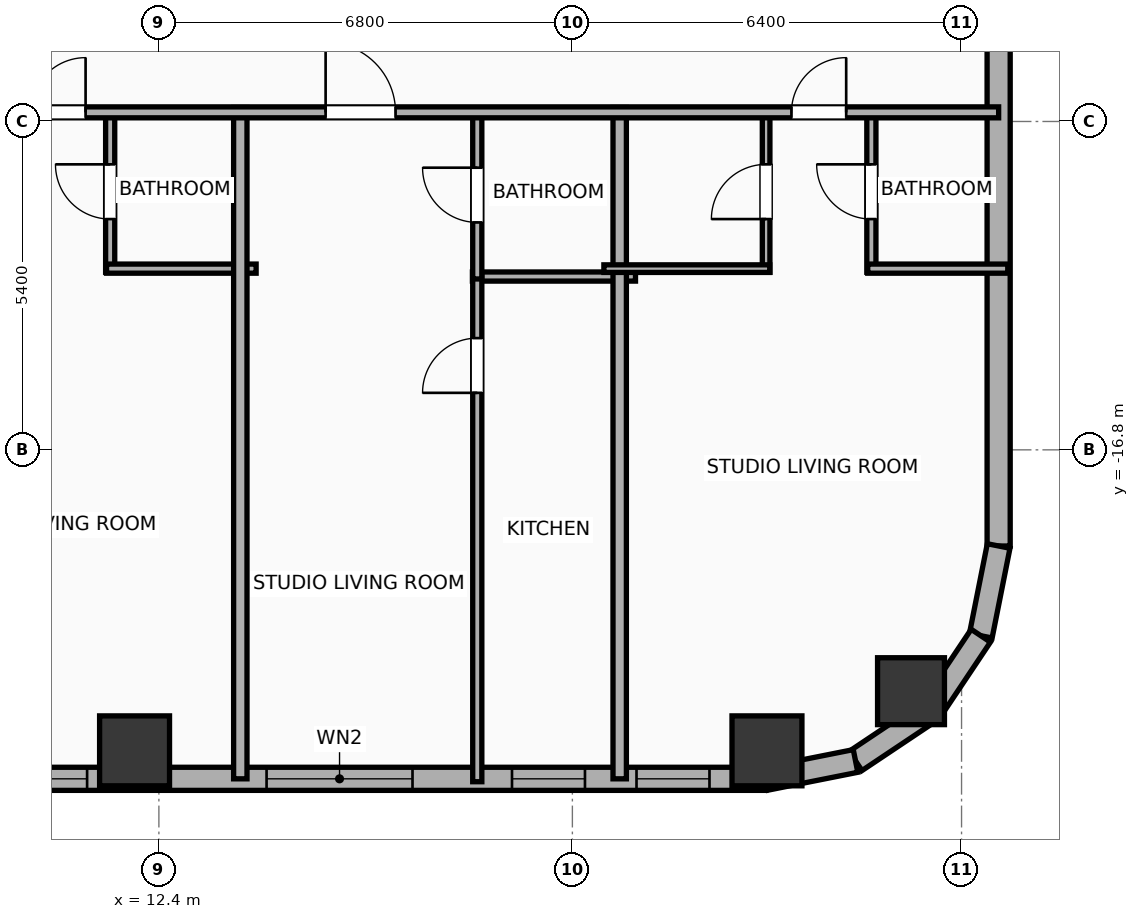
"""IFC4 building model, lengths in metres.
Left out: names, types, materials, properties, quantities, classifications, styles, units other than length and angle.
Written with IfcOpenShell. Run it as: python <this file> out.ifc"""

import sys

from ifc_helpers import new_model, si_unit, direction, frame, frame_2d, origin, origin_2d, place, context, subcontext, project, spatial, rectangle, hollow_rectangle, hollow_circle, extrude, element, fill, save


model = new_model("IFC4")
c1 = context("Model", 3, precision=1e-05, world=origin(), true_north=direction((0.0, 1.0)))
c2 = subcontext(c1, "Body", "Model", "MODEL_VIEW")
j1 = project(units=[si_unit("LENGTHUNIT", "METRE"), si_unit("PLANEANGLEUNIT", "RADIAN")], contexts=[c1])
p1 = place(None, origin())
s1 = spatial("IfcSite", under=j1, at=p1, CompositionType="ELEMENT")
p2 = place(p1, origin())
s2 = spatial("IfcBuilding", under=s1, at=p2, CompositionType="ELEMENT")
p3 = place(p2, frame((0.0, 0.0, 76.7)))
s3 = spatial("IfcBuildingStorey", under=s2, at=p3, CompositionType="ELEMENT", Elevation=76.7)
for number, where, z_axis, x_axis in (
    (1, (12.0, -21.75, 0.0), (0.0, 0.0, 1.0), (1.0, 0.0, 0.0)),
    (2, (22.4, -21.75, 0.0), (0.0, 0.0, 1.0), (1.0, 0.0, 0.0)),
):
    element("IfcColumn", number, at=place(p3, frame(where, z_axis=z_axis, x_axis=x_axis)), inside=s3, PredefinedType="COLUMN", context=c2, shape_type="SweptSolid", body=[
        extrude(hollow_rectangle(XDim=1.15, YDim=1.15, WallThickness=0.04, at=origin_2d()), origin(), (0.0, 0.0, 1.0), 3.9),
    ])
p4 = place(p3, frame((24.769, -20.769, 0.0), z_axis=(0.0, 0.0, 1.0), x_axis=(1.0, 0.0, 0.0)))
e3 = element("IfcColumn", 3, at=p4, inside=s3, PredefinedType="COLUMN", context=c2, shape_type="SweptSolid", body=[
    extrude(hollow_circle(Radius=0.55, WallThickness=0.036, at=origin_2d()), origin(), (0.0, 0.0, 1.0), 3.9),
])
p5 = place(p3, frame((22.381, -22.21, 0.0), z_axis=(0.0, 0.0, 1.0), x_axis=(-1.0, 0.0, 0.0)))
e4 = element("IfcWall", 4, at=p5, inside=s3, PredefinedType="ELEMENTEDWALL", context=c2, shape_type="SweptSolid", body=[
    extrude(rectangle(XDim=51.963, YDim=0.38, at=frame_2d((25.981, 0.0))), origin(), (0.0, 0.0, 1.0), 3.6),
])
p6 = place(p5, frame((5.81, 0.0, 0.75)))
e5 = element("IfcOpeningElement", 5, at=p6, cuts=e4, PredefinedType="OPENING", context=c2, shape_type="SweptSolid", body=[
    extrude(rectangle(XDim=2.4, YDim=2.1, at=frame_2d((1.2, 1.05))), frame((0.0, 0.2, 0.0), z_axis=(0.0, -1.0, 0.0), x_axis=(1.0, 0.0, 0.0)), (0.0, 0.0, 1.0), 0.4),
])
p7 = place(p5, frame((49.106, 0.0, 0.75)))
e6 = element("IfcOpeningElement", 6, at=p7, cuts=e4, PredefinedType="OPENING", context=c2, shape_type="SweptSolid", body=[
    extrude(rectangle(XDim=1.2, YDim=2.05, at=frame_2d((0.6, 1.025))), frame((0.0, 0.2, 0.0), z_axis=(0.0, -1.0, 0.0), x_axis=(1.0, 0.0, 0.0)), (0.0, 0.0, 1.0), 0.4),
])
p8 = place(p5, frame((45.716, 0.0, 0.75)))
e7 = element("IfcOpeningElement", 7, at=p8, cuts=e4, PredefinedType="OPENING", context=c2, shape_type="SweptSolid", body=[
    extrude(rectangle(XDim=1.2, YDim=2.05, at=frame_2d((0.6, 1.025))), frame((0.0, 0.2, 0.0), z_axis=(0.0, -1.0, 0.0), x_axis=(1.0, 0.0, 0.0)), (0.0, 0.0, 1.0), 0.4),
])
p9 = place(p5, frame((42.346, 0.0, 0.75)))
e8 = element("IfcOpeningElement", 8, at=p9, cuts=e4, PredefinedType="OPENING", context=c2, shape_type="SweptSolid", body=[
    extrude(rectangle(XDim=1.2, YDim=2.05, at=frame_2d((0.6, 1.025))), frame((0.0, 0.2, 0.0), z_axis=(0.0, -1.0, 0.0), x_axis=(1.0, 0.0, 0.0)), (0.0, 0.0, 1.0), 0.4),
])
p10 = place(p5, frame((35.811, 0.0, 0.75)))
e9 = element("IfcOpeningElement", 9, at=p10, cuts=e4, PredefinedType="OPENING", context=c2, shape_type="SweptSolid", body=[
    extrude(rectangle(XDim=1.2, YDim=2.05, at=frame_2d((0.6, 1.025))), frame((0.0, 0.2, 0.0), z_axis=(0.0, -1.0, 0.0), x_axis=(1.0, 0.0, 0.0)), (0.0, 0.0, 1.0), 0.4),
])
p11 = place(p5, frame((39.061, 0.0, 0.75)))
e10 = element("IfcOpeningElement", 10, at=p11, cuts=e4, PredefinedType="OPENING", context=c2, shape_type="SweptSolid", body=[
    extrude(rectangle(XDim=1.2, YDim=2.05, at=frame_2d((0.6, 1.025))), frame((0.0, 0.2, 0.0), z_axis=(0.0, -1.0, 0.0), x_axis=(1.0, 0.0, 0.0)), (0.0, 0.0, 1.0), 0.4),
])
p12 = place(p5, frame((29.211, 0.0, 0.75)))
e11 = element("IfcOpeningElement", 11, at=p12, cuts=e4, PredefinedType="OPENING", context=c2, shape_type="SweptSolid", body=[
    extrude(rectangle(XDim=1.2, YDim=2.05, at=frame_2d((0.6, 1.025))), frame((0.0, 0.2, 0.0), z_axis=(0.0, -1.0, 0.0), x_axis=(1.0, 0.0, 0.0)), (0.0, 0.0, 1.0), 0.4),
])
p13 = place(p5, frame((22.757, 0.0, 0.75)))
e12 = element("IfcOpeningElement", 12, at=p13, cuts=e4, PredefinedType="OPENING", context=c2, shape_type="SweptSolid", body=[
    extrude(rectangle(XDim=1.2, YDim=2.05, at=frame_2d((0.6, 1.025))), frame((0.0, 0.2, 0.0), z_axis=(0.0, -1.0, 0.0), x_axis=(1.0, 0.0, 0.0)), (0.0, 0.0, 1.0), 0.4),
])
p14 = place(p5, frame((26.007, 0.0, 0.75)))
e13 = element("IfcOpeningElement", 13, at=p14, cuts=e4, PredefinedType="OPENING", context=c2, shape_type="SweptSolid", body=[
    extrude(rectangle(XDim=1.2, YDim=2.05, at=frame_2d((0.6, 1.025))), frame((0.0, 0.2, 0.0), z_axis=(0.0, -1.0, 0.0), x_axis=(1.0, 0.0, 0.0)), (0.0, 0.0, 1.0), 0.4),
])
p15 = place(p5, frame((18.697, 0.0, 0.75)))
e14 = element("IfcOpeningElement", 14, at=p15, cuts=e4, PredefinedType="OPENING", context=c2, shape_type="SweptSolid", body=[
    extrude(rectangle(XDim=1.2, YDim=2.05, at=frame_2d((0.6, 1.025))), frame((0.0, 0.2, 0.0), z_axis=(0.0, -1.0, 0.0), x_axis=(1.0, 0.0, 0.0)), (0.0, 0.0, 1.0), 0.4),
])
p16 = place(p5, frame((15.447, 0.0, 0.75)))
e15 = element("IfcOpeningElement", 15, at=p16, cuts=e4, PredefinedType="OPENING", context=c2, shape_type="SweptSolid", body=[
    extrude(rectangle(XDim=1.2, YDim=2.05, at=frame_2d((0.6, 1.025))), frame((0.0, 0.2, 0.0), z_axis=(0.0, -1.0, 0.0), x_axis=(1.0, 0.0, 0.0)), (0.0, 0.0, 1.0), 0.4),
])
p17 = place(p5, frame((11.162, 0.0, 0.75)))
e16 = element("IfcOpeningElement", 16, at=p17, cuts=e4, PredefinedType="OPENING", context=c2, shape_type="SweptSolid", body=[
    extrude(rectangle(XDim=1.2, YDim=2.05, at=frame_2d((0.6, 1.025))), frame((0.0, 0.2, 0.0), z_axis=(0.0, -1.0, 0.0), x_axis=(1.0, 0.0, 0.0)), (0.0, 0.0, 1.0), 0.4),
])
p18 = place(p5, frame((2.974, 0.0, 0.75)))
e17 = element("IfcOpeningElement", 17, at=p18, cuts=e4, PredefinedType="OPENING", context=c2, shape_type="SweptSolid", body=[
    extrude(rectangle(XDim=1.2, YDim=2.05, at=frame_2d((0.6, 1.025))), frame((0.0, 0.2, 0.0), z_axis=(0.0, -1.0, 0.0), x_axis=(1.0, 0.0, 0.0)), (0.0, 0.0, 1.0), 0.4),
])
p19 = place(p5, frame((0.927, 0.0, 0.75)))
e18 = element("IfcOpeningElement", 18, at=p19, cuts=e4, PredefinedType="OPENING", context=c2, shape_type="SweptSolid", body=[
    extrude(rectangle(XDim=1.2, YDim=2.05, at=frame_2d((0.6, 1.025))), frame((0.0, 0.2, 0.0), z_axis=(0.0, -1.0, 0.0), x_axis=(1.0, 0.0, 0.0)), (0.0, 0.0, 1.0), 0.4),
])
p20 = place(p3, frame((26.21, 18.381, 0.0), z_axis=(0.0, 0.0, 1.0), x_axis=(0.0, -1.0, 0.0)))
e19 = element("IfcWall", 19, at=p20, inside=s3, PredefinedType="ELEMENTEDWALL", context=c2, shape_type="SweptSolid", body=[
    extrude(rectangle(XDim=36.763, YDim=0.38, at=frame_2d((18.381, 0.0))), origin(), (0.0, 0.0, 1.0), 3.6),
])
p21 = place(p3, frame((26.21, -18.381, 0.0), z_axis=(0.0, 0.0, 1.0), x_axis=(-0.195086038585, -0.980786132421, 0.0)))
e20 = element("IfcWall", 20, at=p21, inside=s3, PredefinedType="ELEMENTEDWALL", context=c2, shape_type="SweptSolid", body=[
    extrude(rectangle(XDim=1.504, YDim=0.38, at=frame_2d((0.752, 0.0))), origin(), (0.0, 0.0, 1.0), 3.6),
])
for number, where, z_axis, x_axis in (
    (21, (25.917, -19.857, 0.0), (0.0, 0.0, 1.0), (-0.556, -0.831, 0.0)),
    (22, (25.091, -21.091, 0.0), (0.0, 0.0, 1.0), (-0.831, -0.556, 0.0)),
):
    element("IfcWall", number, at=place(p3, frame(where, z_axis=z_axis, x_axis=x_axis)), inside=s3, PredefinedType="ELEMENTEDWALL", context=c2, shape_type="SweptSolid", body=[
        extrude(rectangle(XDim=1.485, YDim=0.38, at=frame_2d((0.743, 0.0))), origin(), (0.0, 0.0, 1.0), 3.6),
    ])
p22 = place(p3, frame((23.857, -21.917, 0.0), z_axis=(0.0, 0.0, 1.0), x_axis=(-0.980786132421, -0.195086038585, 0.0)))
e23 = element("IfcWall", 23, at=p22, inside=s3, PredefinedType="ELEMENTEDWALL", context=c2, shape_type="SweptSolid", body=[
    extrude(rectangle(XDim=1.504, YDim=0.38, at=frame_2d((0.752, 0.0))), origin(), (0.0, 0.0, 1.0), 3.6),
])
p23 = place(p3, frame((11.599, -13.88, 0.0), z_axis=(0.0, 0.0, 1.0), x_axis=(0.0, 1.0, 0.0)))
e24 = element("IfcWall", 24, at=p23, inside=s3, PredefinedType="PLUMBINGWALL", context=c2, shape_type="SweptSolid", body=[
    extrude(rectangle(XDim=2.65, YDim=0.15, at=frame_2d((1.325, 0.0))), origin(), (0.0, 0.0, 1.0), 3.6),
])
p24 = place(p23, frame((0.875, 0.0, 0.0)))
e25 = element("IfcOpeningElement", 25, at=p24, cuts=e24, PredefinedType="OPENING", context=c2, shape_type="SweptSolid", body=[
    extrude(rectangle(XDim=0.9, YDim=2.05, at=frame_2d((0.45, 1.025))), frame((0.0, 0.085, 0.0), z_axis=(0.0, -1.0, 0.0), x_axis=(1.0, 0.0, 0.0)), (0.0, 0.0, 1.0), 0.17),
])
p25 = place(p3, frame((11.539, -13.82, 0.0), z_axis=(0.0, 0.0, 1.0), x_axis=(1.0, 0.0, 0.0)))
e26 = element("IfcWall", 26, at=p25, inside=s3, PredefinedType="PLUMBINGWALL", context=c2, shape_type="SweptSolid", body=[
    extrude(rectangle(XDim=2.46, YDim=0.15, at=frame_2d((1.23, 0.0))), origin(), (0.0, 0.0, 1.0), 3.6),
])
p26 = place(p3, frame((13.739, -22.21, 0.0), z_axis=(0.0, 0.0, 1.0), x_axis=(0.0, 1.0, 0.0)))
e27 = element("IfcWall", 27, at=p26, inside=s3, PredefinedType="PARTITIONING", context=c2, shape_type="SweptSolid", body=[
    extrude(rectangle(XDim=11.04, YDim=0.22, at=frame_2d((5.52, 0.0))), origin(), (0.0, 0.0, 1.0), 3.6),
])
p27 = place(p3, frame((17.556, -13.95, 0.0), z_axis=(0.0, 0.0, 1.0), x_axis=(1.0, 0.0, 0.0)))
e28 = element("IfcWall", 28, at=p27, inside=s3, PredefinedType="PLUMBINGWALL", context=c2, shape_type="SweptSolid", body=[
    extrude(rectangle(XDim=2.682, YDim=0.15, at=frame_2d((1.341, 0.0))), origin(), (0.0, 0.0, 1.0), 3.6),
])
p28 = place(p3, frame((17.636, -22.258, 0.0), z_axis=(0.0, 0.0, 1.0), x_axis=(0.0, 1.0, 0.0)))
e29 = element("IfcWall", 29, at=p28, inside=s3, PredefinedType="PLUMBINGWALL", context=c2, shape_type="SweptSolid", body=[
    extrude(rectangle(XDim=8.348, YDim=0.15, at=frame_2d((4.174, 0.0))), origin(), (0.0, 0.0, 1.0), 3.6),
])
p29 = place(p28, frame((6.395, 0.0, 0.0)))
e30 = element("IfcOpeningElement", 30, at=p29, cuts=e29, PredefinedType="OPENING", context=c2, shape_type="SweptSolid", body=[
    extrude(rectangle(XDim=0.9, YDim=2.05, at=frame_2d((0.45, 1.025))), frame((0.0, 0.085, 0.0), z_axis=(0.0, -1.0, 0.0), x_axis=(1.0, 0.0, 0.0)), (0.0, 0.0, 1.0), 0.17),
])
p30 = place(p3, frame((17.636, -13.99, 0.0), z_axis=(0.0, 0.0, 1.0), x_axis=(0.0, 1.0, 0.0)))
e31 = element("IfcWall", 31, at=p30, inside=s3, PredefinedType="PLUMBINGWALL", context=c2, shape_type="SweptSolid", body=[
    extrude(rectangle(XDim=2.76, YDim=0.15, at=frame_2d((1.38, 0.0))), origin(), (0.0, 0.0, 1.0), 3.6),
])
p31 = place(p30, frame((0.93, 0.0, 0.0)))
e32 = element("IfcOpeningElement", 32, at=p31, cuts=e31, PredefinedType="OPENING", context=c2, shape_type="SweptSolid", body=[
    extrude(rectangle(XDim=0.9, YDim=2.05, at=frame_2d((0.45, 1.025))), frame((0.0, 0.085, 0.0), z_axis=(0.0, -1.0, 0.0), x_axis=(1.0, 0.0, 0.0)), (0.0, 0.0, 1.0), 0.17),
])
p32 = place(p3, frame((19.978, -22.21, 0.0), z_axis=(0.0, 0.0, 1.0), x_axis=(0.0, 1.0, 0.0)))
e33 = element("IfcWall", 33, at=p32, inside=s3, PredefinedType="PARTITIONING", context=c2, shape_type="SweptSolid", body=[
    extrude(rectangle(XDim=11.04, YDim=0.22, at=frame_2d((5.52, 0.0))), origin(), (0.0, 0.0, 1.0), 2.89),
])
p33 = place(p3, frame((22.386, -13.88, 0.0), z_axis=(0.0, 0.0, 1.0), x_axis=(0.0, 1.0, 0.0)))
e34 = element("IfcWall", 34, at=p33, inside=s3, PredefinedType="PARTITIONING", context=c2, shape_type="SweptSolid", body=[
    extrude(rectangle(XDim=2.65, YDim=0.125, at=frame_2d((1.325, 0.0))), origin(), (0.0, 0.0, 1.0), 3.6),
])
p34 = place(p33, frame((0.875, 0.0, 0.0)))
e35 = element("IfcOpeningElement", 35, at=p34, cuts=e34, PredefinedType="OPENING", context=c2, shape_type="SweptSolid", body=[
    extrude(rectangle(XDim=0.9, YDim=2.05, at=frame_2d((0.45, 1.025))), frame((0.0, 0.073, 0.0), z_axis=(0.0, -1.0, 0.0), x_axis=(1.0, 0.0, 0.0)), (0.0, 0.0, 1.0), 0.145),
])
p35 = place(p3, frame((24.117, -13.88, 0.0), z_axis=(0.0, 0.0, 1.0), x_axis=(0.0, 1.0, 0.0)))
e36 = element("IfcWall", 36, at=p35, inside=s3, PredefinedType="PLUMBINGWALL", context=c2, shape_type="SweptSolid", body=[
    extrude(rectangle(XDim=2.65, YDim=0.15, at=frame_2d((1.325, 0.0))), origin(), (0.0, 0.0, 1.0), 3.6),
])
p36 = place(p35, frame((0.875, 0.0, 0.0)))
e37 = element("IfcOpeningElement", 37, at=p36, cuts=e36, PredefinedType="OPENING", context=c2, shape_type="SweptSolid", body=[
    extrude(rectangle(XDim=0.9, YDim=2.05, at=frame_2d((0.45, 1.025))), frame((0.0, 0.085, 0.0), z_axis=(0.0, -1.0, 0.0), x_axis=(1.0, 0.0, 0.0)), (0.0, 0.0, 1.0), 0.17),
])
p37 = place(p3, frame((19.718, -13.82, 0.0), z_axis=(0.0, 0.0, 1.0), x_axis=(1.0, 0.0, 0.0)))
e38 = element("IfcWall", 38, at=p37, inside=s3, PredefinedType="PARTITIONING", context=c2, shape_type="SweptSolid", body=[
    extrude(rectangle(XDim=2.728, YDim=0.125, at=frame_2d((1.364, 0.0))), origin(), (0.0, 0.0, 1.0), 3.6),
])
p38 = place(p3, frame((24.057, -13.82, 0.0), z_axis=(0.0, 0.0, 1.0), x_axis=(1.0, 0.0, 0.0)))
e39 = element("IfcWall", 39, at=p38, inside=s3, PredefinedType="PLUMBINGWALL", context=c2, shape_type="SweptSolid", body=[
    extrude(rectangle(XDim=2.303, YDim=0.15, at=frame_2d((1.152, 0.0))), origin(), (0.0, 0.0, 1.0), 3.6),
])
p39 = place(p3, frame((-33.41, -11.25, 0.0), z_axis=(0.0, 0.0, 1.0), x_axis=(1.0, 0.0, 0.0)))
e40 = element("IfcWall", 40, at=p39, inside=s3, PredefinedType="PARTITIONING", context=c2, shape_type="SweptSolid", body=[
    extrude(rectangle(XDim=59.62, YDim=0.18, at=frame_2d((29.81, 0.0))), origin(), (0.0, 0.0, 1.0), 3.6),
])
p40 = place(p39, frame((3.282, 0.0, 0.0)))
e41 = element("IfcOpeningElement", 41, at=p40, cuts=e40, PredefinedType="OPENING", context=c2, shape_type="SweptSolid", body=[
    extrude(rectangle(XDim=1.15, YDim=2.05, at=frame_2d((0.575, 1.025))), frame((0.0, 0.1, 0.0), z_axis=(0.0, -1.0, 0.0), x_axis=(1.0, 0.0, 0.0)), (0.0, 0.0, 1.0), 0.2),
])
p41 = place(p39, frame((10.771, 0.0, 0.0)))
e42 = element("IfcOpeningElement", 42, at=p41, cuts=e40, PredefinedType="OPENING", context=c2, shape_type="SweptSolid", body=[
    extrude(rectangle(XDim=1.15, YDim=2.05, at=frame_2d((0.575, 1.025))), frame((0.0, 0.1, 0.0), z_axis=(0.0, -1.0, 0.0), x_axis=(1.0, 0.0, 0.0)), (0.0, 0.0, 1.0), 0.2),
])
p42 = place(p39, frame((18.778, 0.0, 0.0)))
e43 = element("IfcOpeningElement", 43, at=p42, cuts=e40, PredefinedType="OPENING", context=c2, shape_type="SweptSolid", body=[
    extrude(rectangle(XDim=1.15, YDim=2.05, at=frame_2d((0.575, 1.025))), frame((0.0, 0.1, 0.0), z_axis=(0.0, -1.0, 0.0), x_axis=(1.0, 0.0, 0.0)), (0.0, 0.0, 1.0), 0.2),
])
p43 = place(p39, frame((24.34, 0.0, 0.0)))
e44 = element("IfcOpeningElement", 44, at=p43, cuts=e40, PredefinedType="OPENING", context=c2, shape_type="SweptSolid", body=[
    extrude(rectangle(XDim=0.9, YDim=2.05, at=frame_2d((0.45, 1.025))), frame((0.0, 0.1, 0.0), z_axis=(0.0, -1.0, 0.0), x_axis=(1.0, 0.0, 0.0)), (0.0, 0.0, 1.0), 0.2),
])
p44 = place(p39, frame((31.829, 0.0, 0.0)))
e45 = element("IfcOpeningElement", 45, at=p44, cuts=e40, PredefinedType="OPENING", context=c2, shape_type="SweptSolid", body=[
    extrude(rectangle(XDim=1.15, YDim=2.05, at=frame_2d((0.575, 1.025))), frame((0.0, 0.1, 0.0), z_axis=(0.0, -1.0, 0.0), x_axis=(1.0, 0.0, 0.0)), (0.0, 0.0, 1.0), 0.2),
])
p45 = place(p39, frame((35.948, 0.0, 0.0)))
e46 = element("IfcOpeningElement", 46, at=p45, cuts=e40, PredefinedType="OPENING", context=c2, shape_type="SweptSolid", body=[
    extrude(rectangle(XDim=1.15, YDim=2.05, at=frame_2d((0.575, 1.025))), frame((0.0, 0.1, 0.0), z_axis=(0.0, -1.0, 0.0), x_axis=(1.0, 0.0, 0.0)), (0.0, 0.0, 1.0), 0.2),
])
p46 = place(p39, frame((43.705, 0.0, 0.0)))
e47 = element("IfcOpeningElement", 47, at=p46, cuts=e40, PredefinedType="OPENING", context=c2, shape_type="SweptSolid", body=[
    extrude(rectangle(XDim=0.9, YDim=2.05, at=frame_2d((0.45, 1.025))), frame((0.0, 0.1, 0.0), z_axis=(0.0, -1.0, 0.0), x_axis=(1.0, 0.0, 0.0)), (0.0, 0.0, 1.0), 0.2),
])
p47 = place(p39, frame((48.552, 0.0, 0.0)))
e48 = element("IfcOpeningElement", 48, at=p47, cuts=e40, PredefinedType="OPENING", context=c2, shape_type="SweptSolid", body=[
    extrude(rectangle(XDim=1.15, YDim=2.05, at=frame_2d((0.575, 1.025))), frame((0.0, 0.1, 0.0), z_axis=(0.0, -1.0, 0.0), x_axis=(1.0, 0.0, 0.0)), (0.0, 0.0, 1.0), 0.2),
])
p48 = place(p39, frame((56.213, 0.0, 0.0)))
e49 = element("IfcOpeningElement", 49, at=p48, cuts=e40, PredefinedType="OPENING", context=c2, shape_type="SweptSolid", body=[
    extrude(rectangle(XDim=0.9, YDim=2.05, at=frame_2d((0.45, 1.025))), frame((0.0, 0.1, 0.0), z_axis=(0.0, -1.0, 0.0), x_axis=(1.0, 0.0, 0.0)), (0.0, 0.0, 1.0), 0.2),
])
p49 = place(p6, origin())
e50 = element("IfcWindow", 50, at=p49, inside=s3, PartitioningType="SINGLE_PANEL", PredefinedType="WINDOW", context=c2, shape_type="SweptSolid", body=[
    extrude(rectangle(XDim=2.4, YDim=2.1, at=frame_2d((1.2, 1.05))), frame((0.0, 0.03, 0.0), z_axis=(0.0, -1.0, 0.0), x_axis=(1.0, 0.0, 0.0)), (0.0, 0.0, 1.0), 0.06),
])
fill(e5, e50)
p50 = place(p17, origin())
e51 = element("IfcWindow", 51, at=p50, inside=s3, PartitioningType="SINGLE_PANEL", PredefinedType="WINDOW", context=c2, shape_type="SweptSolid", body=[
    extrude(rectangle(XDim=1.2, YDim=2.05, at=frame_2d((0.6, 1.025))), frame((0.0, 0.03, 0.0), z_axis=(0.0, -1.0, 0.0), x_axis=(1.0, 0.0, 0.0)), (0.0, 0.0, 1.0), 0.06),
])
fill(e16, e51)
p51 = place(p18, origin())
e52 = element("IfcWindow", 52, at=p51, inside=s3, PartitioningType="SINGLE_PANEL", PredefinedType="WINDOW", context=c2, shape_type="SweptSolid", body=[
    extrude(rectangle(XDim=1.2, YDim=2.05, at=frame_2d((0.6, 1.025))), frame((0.0, 0.03, 0.0), z_axis=(0.0, -1.0, 0.0), x_axis=(1.0, 0.0, 0.0)), (0.0, 0.0, 1.0), 0.06),
])
fill(e17, e52)
p52 = place(p19, origin())
e53 = element("IfcWindow", 53, at=p52, inside=s3, PartitioningType="SINGLE_PANEL", PredefinedType="WINDOW", context=c2, shape_type="SweptSolid", body=[
    extrude(rectangle(XDim=1.2, YDim=2.05, at=frame_2d((0.6, 1.025))), frame((0.0, 0.03, 0.0), z_axis=(0.0, -1.0, 0.0), x_axis=(1.0, 0.0, 0.0)), (0.0, 0.0, 1.0), 0.06),
])
fill(e18, e53)
p53 = place(p24, origin())
e54 = element("IfcDoor", 54, at=p53, inside=s3, OperationType="SINGLE_SWING_RIGHT", PredefinedType="DOOR", context=c2, shape_type="SweptSolid", body=[
    extrude(rectangle(XDim=0.9, YDim=2.05, at=frame_2d((0.45, 1.025))), frame((0.0, 0.025, 0.0), z_axis=(0.0, -1.0, 0.0), x_axis=(1.0, 0.0, 0.0)), (0.0, 0.0, 1.0), 0.05),
])
fill(e25, e54)
p54 = place(p29, origin())
e55 = element("IfcDoor", 55, at=p54, inside=s3, OperationType="SINGLE_SWING_LEFT", PredefinedType="DOOR", context=c2, shape_type="SweptSolid", body=[
    extrude(rectangle(XDim=0.9, YDim=2.05, at=frame_2d((0.45, 1.025))), frame((0.0, 0.025, 0.0), z_axis=(0.0, -1.0, 0.0), x_axis=(1.0, 0.0, 0.0)), (0.0, 0.0, 1.0), 0.05),
])
fill(e30, e55)
p55 = place(p31, origin())
e56 = element("IfcDoor", 56, at=p55, inside=s3, OperationType="SINGLE_SWING_RIGHT", PredefinedType="DOOR", context=c2, shape_type="SweptSolid", body=[
    extrude(rectangle(XDim=0.9, YDim=2.05, at=frame_2d((0.45, 1.025))), frame((0.0, 0.025, 0.0), z_axis=(0.0, -1.0, 0.0), x_axis=(1.0, 0.0, 0.0)), (0.0, 0.0, 1.0), 0.05),
])
fill(e32, e56)
p56 = place(p34, origin())
e57 = element("IfcDoor", 57, at=p56, inside=s3, OperationType="SINGLE_SWING_LEFT", PredefinedType="DOOR", context=c2, shape_type="SweptSolid", body=[
    extrude(rectangle(XDim=0.9, YDim=2.05, at=frame_2d((0.45, 1.025))), frame((0.0, 0.025, 0.0), z_axis=(0.0, -1.0, 0.0), x_axis=(1.0, 0.0, 0.0)), (0.0, 0.0, 1.0), 0.05),
])
fill(e35, e57)
p57 = place(p36, origin())
e58 = element("IfcDoor", 58, at=p57, inside=s3, OperationType="SINGLE_SWING_RIGHT", PredefinedType="DOOR", context=c2, shape_type="SweptSolid", body=[
    extrude(rectangle(XDim=0.9, YDim=2.05, at=frame_2d((0.45, 1.025))), frame((0.0, 0.025, 0.0), z_axis=(0.0, -1.0, 0.0), x_axis=(1.0, 0.0, 0.0)), (0.0, 0.0, 1.0), 0.05),
])
fill(e37, e58)
p58 = place(p46, origin())
e59 = element("IfcDoor", 59, at=p58, inside=s3, OperationType="SINGLE_SWING_RIGHT", PredefinedType="DOOR", context=c2, shape_type="SweptSolid", body=[
    extrude(rectangle(XDim=0.9, YDim=2.05, at=frame_2d((0.45, 1.025))), frame((0.0, 0.025, 0.0), z_axis=(0.0, -1.0, 0.0), x_axis=(1.0, 0.0, 0.0)), (0.0, 0.0, 1.0), 0.05),
])
fill(e47, e59)
p59 = place(p47, origin())
e60 = element("IfcDoor", 60, at=p59, inside=s3, OperationType="SINGLE_SWING_LEFT", PredefinedType="DOOR", context=c2, shape_type="SweptSolid", body=[
    extrude(rectangle(XDim=1.15, YDim=2.05, at=frame_2d((0.575, 1.025))), frame((0.0, 0.025, 0.0), z_axis=(0.0, -1.0, 0.0), x_axis=(1.0, 0.0, 0.0)), (0.0, 0.0, 1.0), 0.05),
])
fill(e48, e60)
p60 = place(p48, origin())
e61 = element("IfcDoor", 61, at=p60, inside=s3, OperationType="SINGLE_SWING_RIGHT", PredefinedType="DOOR", context=c2, shape_type="SweptSolid", body=[
    extrude(rectangle(XDim=0.9, YDim=2.05, at=frame_2d((0.45, 1.025))), frame((0.0, 0.025, 0.0), z_axis=(0.0, -1.0, 0.0), x_axis=(1.0, 0.0, 0.0)), (0.0, 0.0, 1.0), 0.05),
])
fill(e49, e61)
save(model, sys.argv[1])
